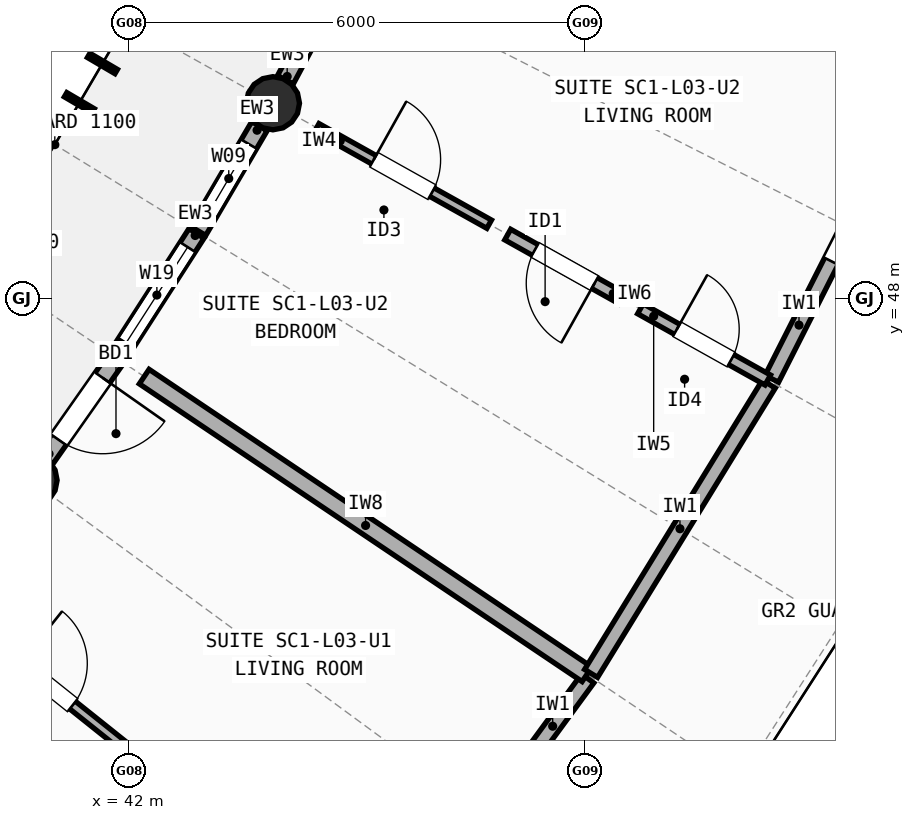
"""IFC4 building model, lengths in metres.
Left out: names, types, materials, properties, quantities, classifications, styles, units other than length and angle.
Written with IfcOpenShell. Run it as: python <this file> out.ifc"""

import sys

from ifc_helpers import new_model, si_unit, direction, frame, frame_2d, origin, origin_2d, place, context, subcontext, project, spatial, rectangle, circle, extrude, element, fill, save


model = new_model("IFC4")
c1 = context("Model", 3, precision=1e-05, world=origin(), true_north=direction((0.0, 1.0)))
c2 = subcontext(c1, "Body", "Model", "MODEL_VIEW")
j1 = project(units=[si_unit("LENGTHUNIT", "METRE"), si_unit("PLANEANGLEUNIT", "RADIAN")], contexts=[c1])
p1 = place(None, origin())
s1 = spatial("IfcSite", under=j1, at=p1, CompositionType="ELEMENT")
p2 = place(p1, origin())
s2 = spatial("IfcBuilding", under=s1, at=p2, CompositionType="ELEMENT")
p3 = place(p2, frame((0.0, 0.0, 10.9)))
s3 = spatial("IfcBuildingStorey", under=s2, at=p3, CompositionType="ELEMENT", Elevation=10.9)
for number, where, z_axis, x_axis in (
    (1, (40.704, 45.61, 0.0), (0.0, 0.0, 1.0), (1.0, 0.0, 0.0)),
    (2, (43.893, 50.57, 0.0), (0.0, 0.0, 1.0), (1.0, 0.0, 0.0)),
):
    element("IfcColumn", number, at=place(p3, frame(where, z_axis=z_axis, x_axis=x_axis)), inside=s3, PredefinedType="COLUMN", context=c2, shape_type="SweptSolid", body=[
        extrude(circle(Radius=0.35, at=origin_2d()), origin(), (0.0, 0.0, 1.0), 2.948),
    ])
p4 = place(p3, frame((40.905, 45.896, 0.0), z_axis=(0.0, 0.0, 1.0), x_axis=(0.574754617893, 0.818325808716, 0.0)))
e3 = element("IfcWall", 3, at=p4, inside=s3, PredefinedType="STANDARD", context=c2, shape_type="SweptSolid", body=[
    extrude(rectangle(XDim=1.597, YDim=0.235, at=frame_2d((0.798, 0.0))), origin(), (0.0, 0.0, 1.0), 2.684),
])
p5 = place(p4, frame((0.298, 0.0, 0.0)))
e4 = element("IfcOpeningElement", 4, at=p5, cuts=e3, PredefinedType="OPENING", context=c2, shape_type="SweptSolid", body=[
    extrude(rectangle(XDim=1.0, YDim=2.15, at=frame_2d((0.5, 1.075))), frame((0.0, 0.127, 0.0), z_axis=(0.0, -1.0, 0.0), x_axis=(1.0, 0.0, 0.0)), (0.0, 0.0, 1.0), 0.255),
])
p6 = place(p3, frame((41.845, 47.236, 0.0), z_axis=(0.0, 0.0, 1.0), x_axis=(0.540911277163, 0.841079657486, 0.0)))
e5 = element("IfcWall", 5, at=p6, inside=s3, PredefinedType="STANDARD", context=c2, shape_type="SweptSolid", body=[
    extrude(rectangle(XDim=1.927, YDim=0.235, at=frame_2d((0.963, 0.0))), origin(), (0.0, 0.0, 1.0), 2.684),
])
p7 = place(p6, frame((0.213, 0.0, 0.85)))
e6 = element("IfcOpeningElement", 6, at=p7, cuts=e5, PredefinedType="OPENING", context=c2, shape_type="SweptSolid", body=[
    extrude(rectangle(XDim=1.5, YDim=1.5, at=frame_2d((0.75, 0.75))), frame((0.0, 0.127, 0.0), z_axis=(0.0, -1.0, 0.0), x_axis=(1.0, 0.0, 0.0)), (0.0, 0.0, 1.0), 0.255),
])
p8 = place(p3, frame((42.908, 48.891, 0.0), z_axis=(0.0, 0.0, 1.0), x_axis=(0.505970625323, 0.862550709414, 0.0)))
e7 = element("IfcWall", 7, at=p8, inside=s3, PredefinedType="STANDARD", context=c2, shape_type="SweptSolid", body=[
    extrude(rectangle(XDim=1.597, YDim=0.235, at=frame_2d((0.798, 0.0))), origin(), (0.0, 0.0, 1.0), 2.684),
])
p9 = place(p8, frame((0.273, 0.0, 0.85)))
e8 = element("IfcOpeningElement", 8, at=p9, cuts=e7, PredefinedType="OPENING", context=c2, shape_type="SweptSolid", body=[
    extrude(rectangle(XDim=1.05, YDim=1.35, at=frame_2d((0.525, 0.675))), frame((0.0, 0.127, 0.0), z_axis=(0.0, -1.0, 0.0), x_axis=(1.0, 0.0, 0.0)), (0.0, 0.0, 1.0), 0.255),
])
p10 = place(p3, frame((44.058, 50.879, 0.0), z_axis=(0.0, 0.0, 1.0), x_axis=(0.470183436771, 0.882568714484, 0.0)))
e9 = element("IfcWall", 9, at=p10, inside=s3, PredefinedType="STANDARD", context=c2, shape_type="SweptSolid", body=[
    extrude(rectangle(XDim=1.597, YDim=0.235, at=frame_2d((0.798, 0.0))), origin(), (0.0, 0.0, 1.0), 2.684),
])
p11 = place(p10, frame((0.248, 0.0, 0.85)))
e10 = element("IfcOpeningElement", 10, at=p11, cuts=e9, PredefinedType="OPENING", context=c2, shape_type="SweptSolid", body=[
    extrude(rectangle(XDim=1.1, YDim=1.45, at=frame_2d((0.55, 0.725))), frame((0.0, 0.127, 0.0), z_axis=(0.0, -1.0, 0.0), x_axis=(1.0, 0.0, 0.0)), (0.0, 0.0, 1.0), 0.255),
])
p12 = place(p3, frame((45.393, 39.4, 0.0), z_axis=(0.0, 0.0, 1.0), x_axis=(0.591475021239, 0.806323321783, 0.0)))
e11 = element("IfcWall", 11, at=p12, inside=s3, PredefinedType="SOLIDWALL", context=c2, shape_type="SweptSolid", body=[
    extrude(rectangle(XDim=4.467, YDim=0.2, at=frame_2d((2.233, 0.0))), origin(), (0.0, 0.0, 1.0), 2.762),
])
p13 = place(p12, frame((1.708, 0.0, 0.0)))
e12 = element("IfcOpeningElement", 12, at=p13, cuts=e11, PredefinedType="OPENING", context=c2, shape_type="SweptSolid", body=[
    extrude(rectangle(XDim=1.05, YDim=2.15, at=frame_2d((0.525, 1.075))), frame((0.0, 0.11, 0.0), z_axis=(0.0, -1.0, 0.0), x_axis=(1.0, 0.0, 0.0)), (0.0, 0.0, 1.0), 0.22),
])
p14 = place(p3, frame((39.774, 43.836, 0.0), z_axis=(0.0, 0.0, 1.0), x_axis=(0.781431339385, -0.623991235377, 0.0)))
e13 = element("IfcWall", 13, at=p14, inside=s3, PredefinedType="PARTITIONING", context=c2, shape_type="SweptSolid", body=[
    extrude(rectangle(XDim=2.92, YDim=0.125, at=frame_2d((1.46, 0.0))), origin(), (0.0, 0.0, 1.0), 2.742),
])
p15 = place(p14, frame((1.02, 0.0, 0.0)))
e14 = element("IfcOpeningElement", 14, at=p15, cuts=e13, PredefinedType="OPENING", context=c2, shape_type="SweptSolid", body=[
    extrude(rectangle(XDim=0.88, YDim=2.1, at=frame_2d((0.44, 1.05))), frame((0.0, 0.073, 0.0), z_axis=(0.0, -1.0, 0.0), x_axis=(1.0, 0.0, 0.0)), (0.0, 0.0, 1.0), 0.145),
])
p16 = place(p3, frame((42.2, 46.974, 0.0), z_axis=(0.0, 0.0, 1.0), x_axis=(0.82987699708, -0.55794638606, 0.0)))
e15 = element("IfcWall", 15, at=p16, inside=s3, PredefinedType="SOLIDWALL", context=c2, shape_type="SweptSolid", body=[
    extrude(rectangle(XDim=7.02, YDim=0.23, at=frame_2d((3.51, 0.0))), origin(), (0.0, 0.0, 1.0), 2.722),
])
p17 = place(p3, frame((48.08, 43.069, 0.0), z_axis=(0.0, 0.0, 1.0), x_axis=(0.523444746739, 0.852059620632, 0.0)))
e16 = element("IfcWall", 16, at=p17, inside=s3, PredefinedType="SOLIDWALL", context=c2, shape_type="SweptSolid", body=[
    extrude(rectangle(XDim=4.467, YDim=0.2, at=frame_2d((2.234, 0.0))), origin(), (0.0, 0.0, 1.0), 2.742),
])
p18 = place(p3, frame((50.457, 46.945, 0.0), z_axis=(0.0, 0.0, 1.0), x_axis=(0.451972910967, 0.892031662976, 0.0)))
e17 = element("IfcWall", 17, at=p18, inside=s3, PredefinedType="SOLIDWALL", context=c2, shape_type="SweptSolid", body=[
    extrude(rectangle(XDim=4.467, YDim=0.2, at=frame_2d((2.234, 0.0))), origin(), (0.0, 0.0, 1.0), 2.722),
])
p19 = place(p18, frame((1.734, 0.0, 0.0)))
e18 = element("IfcOpeningElement", 18, at=p19, cuts=e17, PredefinedType="OPENING", context=c2, shape_type="SweptSolid", body=[
    extrude(rectangle(XDim=1.0, YDim=2.15, at=frame_2d((0.5, 1.075))), frame((0.0, 0.11, 0.0), z_axis=(0.0, -1.0, 0.0), x_axis=(1.0, 0.0, 0.0)), (0.0, 0.0, 1.0), 0.22),
])
p20 = place(p3, frame((44.469, 50.248, 0.0), z_axis=(0.0, 0.0, 1.0), x_axis=(0.872794081277, -0.488088610487, 0.0)))
e19 = element("IfcWall", 19, at=p20, inside=s3, PredefinedType="PARTITIONING", context=c2, shape_type="SweptSolid", body=[
    extrude(rectangle(XDim=2.6, YDim=0.125, at=frame_2d((1.3, 0.0))), origin(), (0.0, 0.0, 1.0), 2.762),
])
p21 = place(p20, frame((0.86, 0.0, 0.0)))
e20 = element("IfcOpeningElement", 20, at=p21, cuts=e19, PredefinedType="OPENING", context=c2, shape_type="SweptSolid", body=[
    extrude(rectangle(XDim=0.88, YDim=2.1, at=frame_2d((0.44, 1.05))), frame((0.0, 0.073, 0.0), z_axis=(0.0, -1.0, 0.0), x_axis=(1.0, 0.0, 0.0)), (0.0, 0.0, 1.0), 0.145),
])
p22 = place(p3, frame((46.983, 48.842, 0.0), z_axis=(0.0, 0.0, 1.0), x_axis=(0.872774545553, -0.48812354239, 0.0)))
e21 = element("IfcWall", 21, at=p22, inside=s3, PredefinedType="PLUMBINGWALL", context=c2, shape_type="SweptSolid", body=[
    extrude(rectangle(XDim=1.72, YDim=0.16, at=frame_2d((0.86, 0.0))), origin(), (0.0, 0.0, 1.0), 2.762),
])
p23 = place(p22, frame((0.41, 0.0, 0.0)))
e22 = element("IfcOpeningElement", 22, at=p23, cuts=e21, PredefinedType="OPENING", context=c2, shape_type="SweptSolid", body=[
    extrude(rectangle(XDim=0.9, YDim=2.1, at=frame_2d((0.45, 1.05))), frame((0.0, 0.09, 0.0), z_axis=(0.0, -1.0, 0.0), x_axis=(1.0, 0.0, 0.0)), (0.0, 0.0, 1.0), 0.18),
])
p24 = place(p3, frame((48.728, 47.866, 0.0), z_axis=(0.0, 0.0, 1.0), x_axis=(0.8728224149, -0.488037941198, 0.0)))
e23 = element("IfcWall", 23, at=p24, inside=s3, PredefinedType="PARTITIONING", context=c2, shape_type="SweptSolid", body=[
    extrude(rectangle(XDim=1.92, YDim=0.15, at=frame_2d((0.96, 0.0))), origin(), (0.0, 0.0, 1.0), 2.762),
])
p25 = place(p24, frame((0.55, 0.0, 0.0)))
e24 = element("IfcOpeningElement", 24, at=p25, cuts=e23, PredefinedType="OPENING", context=c2, shape_type="SweptSolid", body=[
    extrude(rectangle(XDim=0.82, YDim=2.08, at=frame_2d((0.41, 1.04))), frame((0.0, 0.085, 0.0), z_axis=(0.0, -1.0, 0.0), x_axis=(1.0, 0.0, 0.0)), (0.0, 0.0, 1.0), 0.17),
])
p26 = place(p3, frame((46.071, 53.896, 0.0), z_axis=(0.0, 0.0, 1.0), x_axis=(0.909807068599, -0.415031442095, 0.0)))
e25 = element("IfcWall", 25, at=p26, inside=s3, PredefinedType="SOLIDWALL", context=c2, shape_type="SweptSolid", body=[
    extrude(rectangle(XDim=7.02, YDim=0.23, at=frame_2d((3.51, 0.0))), origin(), (0.0, 0.0, 1.0), 2.742),
])
p27 = place(p5, origin())
e26 = element("IfcDoor", 26, at=p27, inside=s3, OperationType="SINGLE_SWING_RIGHT", PredefinedType="DOOR", context=c2, shape_type="SweptSolid", body=[
    extrude(rectangle(XDim=1.0, YDim=2.15, at=frame_2d((0.5, 1.075))), frame((0.0, 0.025, 0.0), z_axis=(0.0, -1.0, 0.0), x_axis=(1.0, 0.0, 0.0)), (0.0, 0.0, 1.0), 0.05),
])
fill(e4, e26)
p28 = place(p7, origin())
e27 = element("IfcWindow", 27, at=p28, inside=s3, PartitioningType="SINGLE_PANEL", PredefinedType="WINDOW", context=c2, shape_type="SweptSolid", body=[
    extrude(rectangle(XDim=1.5, YDim=1.5, at=frame_2d((0.75, 0.75))), frame((0.0, 0.03, 0.0), z_axis=(0.0, -1.0, 0.0), x_axis=(1.0, 0.0, 0.0)), (0.0, 0.0, 1.0), 0.06),
])
fill(e6, e27)
p29 = place(p9, origin())
e28 = element("IfcWindow", 28, at=p29, inside=s3, PartitioningType="SINGLE_PANEL", PredefinedType="WINDOW", context=c2, shape_type="SweptSolid", body=[
    extrude(rectangle(XDim=1.05, YDim=1.35, at=frame_2d((0.525, 0.675))), frame((0.0, 0.03, 0.0), z_axis=(0.0, -1.0, 0.0), x_axis=(1.0, 0.0, 0.0)), (0.0, 0.0, 1.0), 0.06),
])
fill(e8, e28)
p30 = place(p11, origin())
e29 = element("IfcWindow", 29, at=p30, inside=s3, PartitioningType="SINGLE_PANEL", PredefinedType="WINDOW", context=c2, shape_type="SweptSolid", body=[
    extrude(rectangle(XDim=1.1, YDim=1.45, at=frame_2d((0.55, 0.725))), frame((0.0, 0.03, 0.0), z_axis=(0.0, -1.0, 0.0), x_axis=(1.0, 0.0, 0.0)), (0.0, 0.0, 1.0), 0.06),
])
fill(e10, e29)
p31 = place(p15, origin())
e30 = element("IfcDoor", 30, at=p31, inside=s3, OperationType="SINGLE_SWING_LEFT", PredefinedType="DOOR", context=c2, shape_type="SweptSolid", body=[
    extrude(rectangle(XDim=0.88, YDim=2.1, at=frame_2d((0.44, 1.05))), frame((0.0, 0.025, 0.0), z_axis=(0.0, -1.0, 0.0), x_axis=(1.0, 0.0, 0.0)), (0.0, 0.0, 1.0), 0.05),
])
fill(e14, e30)
p32 = place(p19, origin())
e31 = element("IfcDoor", 31, at=p32, inside=s3, OperationType="SINGLE_SWING_RIGHT", PredefinedType="DOOR", context=c2, shape_type="SweptSolid", body=[
    extrude(rectangle(XDim=1.0, YDim=2.15, at=frame_2d((0.5, 1.075))), frame((0.0, 0.025, 0.0), z_axis=(0.0, -1.0, 0.0), x_axis=(1.0, 0.0, 0.0)), (0.0, 0.0, 1.0), 0.05),
])
fill(e18, e31)
p33 = place(p21, origin())
e32 = element("IfcDoor", 32, at=p33, inside=s3, OperationType="SINGLE_SWING_LEFT", PredefinedType="DOOR", context=c2, shape_type="SweptSolid", body=[
    extrude(rectangle(XDim=0.88, YDim=2.1, at=frame_2d((0.44, 1.05))), frame((0.0, 0.025, 0.0), z_axis=(0.0, -1.0, 0.0), x_axis=(1.0, 0.0, 0.0)), (0.0, 0.0, 1.0), 0.05),
])
fill(e20, e32)
p34 = place(p23, origin())
e33 = element("IfcDoor", 33, at=p34, inside=s3, OperationType="SINGLE_SWING_RIGHT", PredefinedType="DOOR", context=c2, shape_type="SweptSolid", body=[
    extrude(rectangle(XDim=0.9, YDim=2.1, at=frame_2d((0.45, 1.05))), frame((0.0, 0.025, 0.0), z_axis=(0.0, -1.0, 0.0), x_axis=(1.0, 0.0, 0.0)), (0.0, 0.0, 1.0), 0.05),
])
fill(e22, e33)
p35 = place(p25, origin())
e34 = element("IfcDoor", 34, at=p35, inside=s3, OperationType="SINGLE_SWING_LEFT", PredefinedType="DOOR", context=c2, shape_type="SweptSolid", body=[
    extrude(rectangle(XDim=0.82, YDim=2.08, at=frame_2d((0.41, 1.04))), frame((0.0, 0.025, 0.0), z_axis=(0.0, -1.0, 0.0), x_axis=(1.0, 0.0, 0.0)), (0.0, 0.0, 1.0), 0.05),
])
fill(e24, e34)
save(model, sys.argv[1])
